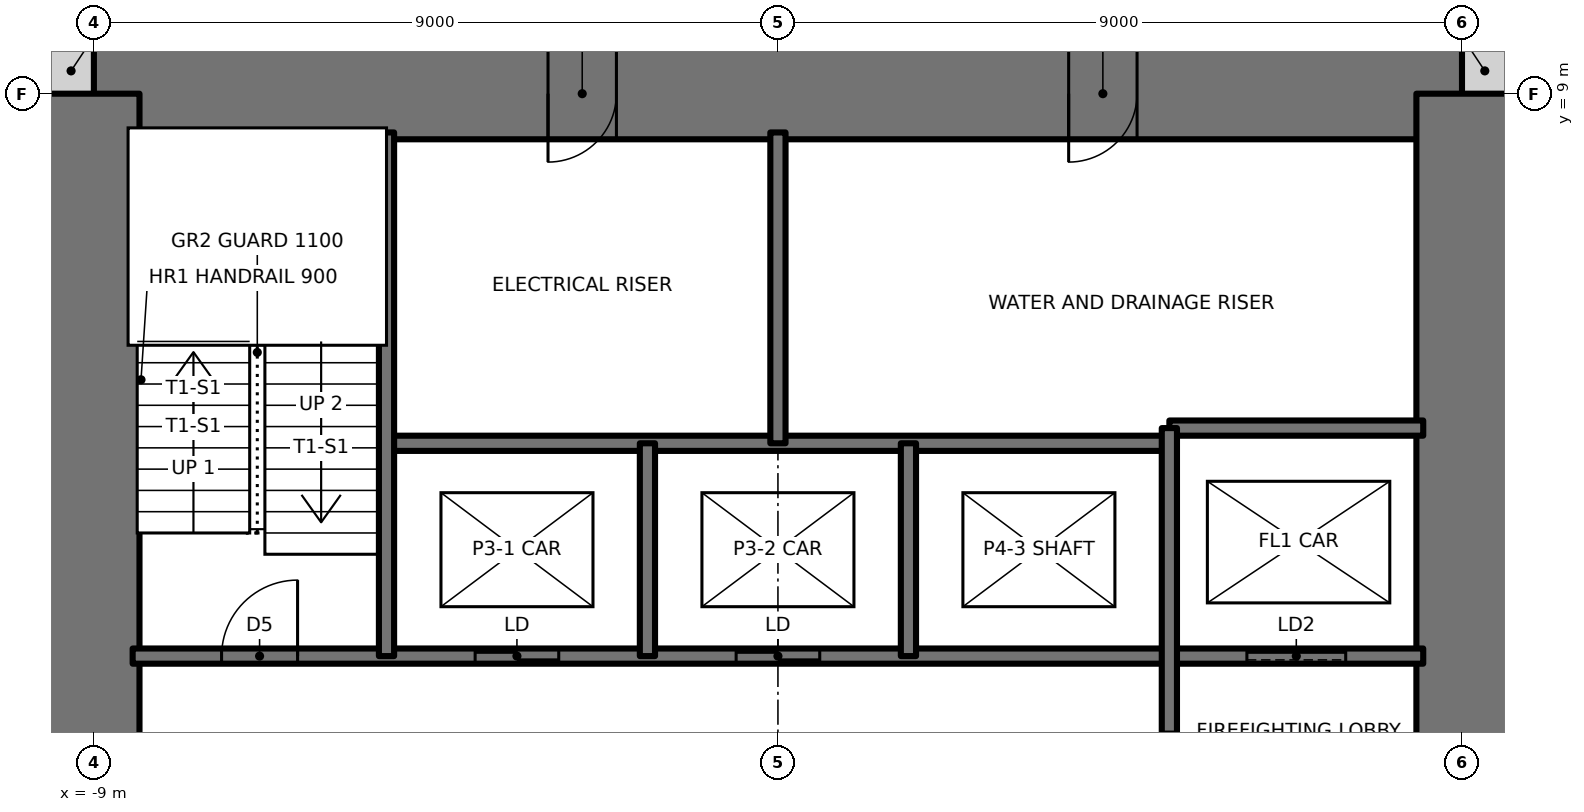
"""IFC4 building model, lengths in metres.
Left out: names, types, materials, properties, quantities, classifications, styles, units other than length and angle.
Written with IfcOpenShell. Run it as: python <this file> out.ifc"""

import sys

from ifc_helpers import new_model, si_unit, direction, frame, frame_2d, origin, place, context, subcontext, project, spatial, rectangle, extrude, element, fill, save


model = new_model("IFC4")
c1 = context("Model", 3, precision=1e-05, world=origin(), true_north=direction((0.0, 1.0)))
c2 = subcontext(c1, "Body", "Model", "MODEL_VIEW")
j1 = project(units=[si_unit("LENGTHUNIT", "METRE"), si_unit("PLANEANGLEUNIT", "RADIAN")], contexts=[c1])
p1 = place(None, origin())
s1 = spatial("IfcSite", under=j1, at=p1, CompositionType="ELEMENT")
p2 = place(p1, origin())
s2 = spatial("IfcBuilding", under=s1, at=p2, CompositionType="ELEMENT")
p3 = place(p2, frame((0.0, 0.0, 188.0)))
s3 = spatial("IfcBuildingStorey", under=s2, at=p3, CompositionType="ELEMENT", Elevation=188.0)
for number, where, z_axis, x_axis in (
    (1, (9.0, 9.3, 0.0), (0.0, 0.0, 1.0), (1.0, 0.0, 0.0)),
    (2, (-9.6, 9.3, 0.0), (0.0, 0.0, 1.0), (1.0, 0.0, 0.0)),
):
    element("IfcWall", number, at=place(p3, frame(where, z_axis=z_axis, x_axis=x_axis)), inside=s3, PredefinedType="SOLIDWALL", context=c2, shape_type="SweptSolid", body=[
        extrude(rectangle(XDim=0.6, YDim=0.6, at=frame_2d((0.3, 0.0))), origin(), (0.0, 0.0, 1.0), 3.5),
    ])
p4 = place(p3, frame((9.0, 9.0, 0.0), z_axis=(0.0, 0.0, 1.0), x_axis=(-1.0, 0.0, 0.0)))
e3 = element("IfcWall", 3, at=p4, inside=s3, PredefinedType="SHEAR", context=c2, shape_type="SweptSolid", body=[
    extrude(rectangle(XDim=18.0, YDim=1.2, at=frame_2d((9.0, 0.0))), origin(), (0.0, 0.0, 1.0), 3.5),
])
p5 = place(p4, frame((11.125, 0.0, 0.0)))
e4 = element("IfcOpeningElement", 4, at=p5, cuts=e3, PredefinedType="OPENING", context=c2, shape_type="SweptSolid", body=[
    extrude(rectangle(XDim=0.9, YDim=2.1, at=frame_2d((0.45, 1.05))), frame((0.0, 0.61, 0.0), z_axis=(0.0, -1.0, 0.0), x_axis=(1.0, 0.0, 0.0)), (0.0, 0.0, 1.0), 1.22),
])
p6 = place(p4, frame((4.275, 0.0, 0.0)))
e5 = element("IfcOpeningElement", 5, at=p6, cuts=e3, PredefinedType="OPENING", context=c2, shape_type="SweptSolid", body=[
    extrude(rectangle(XDim=0.9, YDim=2.1, at=frame_2d((0.45, 1.05))), frame((0.0, 0.61, 0.0), z_axis=(0.0, -1.0, 0.0), x_axis=(1.0, 0.0, 0.0)), (0.0, 0.0, 1.0), 1.22),
])
p7 = place(p3, frame((9.0, -9.0, 0.0), z_axis=(0.0, 0.0, 1.0), x_axis=(0.0, 1.0, 0.0)))
e6 = element("IfcWall", 6, at=p7, inside=s3, PredefinedType="SHEAR", context=c2, shape_type="SweptSolid", body=[
    extrude(rectangle(XDim=18.0, YDim=1.2, at=frame_2d((9.0, 0.0))), origin(), (0.0, 0.0, 1.0), 3.5),
])
p8 = place(p7, frame((8.5, 0.0, 0.0)))
e7 = element("IfcOpeningElement", 7, at=p8, cuts=e6, PredefinedType="OPENING", context=c2, shape_type="SweptSolid", body=[
    extrude(rectangle(XDim=1.0, YDim=2.1, at=frame_2d((0.5, 1.05))), frame((0.0, 0.61, 0.0), z_axis=(0.0, -1.0, 0.0), x_axis=(1.0, 0.0, 0.0)), (0.0, 0.0, 1.0), 1.22),
])
p9 = place(p3, frame((-9.0, 9.0, 0.0), z_axis=(0.0, 0.0, 1.0), x_axis=(0.0, -1.0, 0.0)))
e8 = element("IfcWall", 8, at=p9, inside=s3, PredefinedType="SHEAR", context=c2, shape_type="SweptSolid", body=[
    extrude(rectangle(XDim=18.0, YDim=1.2, at=frame_2d((9.0, 0.0))), origin(), (0.0, 0.0, 1.0), 3.5),
])
p10 = place(p9, frame((8.5, 0.0, 0.0)))
e9 = element("IfcOpeningElement", 9, at=p10, cuts=e8, PredefinedType="OPENING", context=c2, shape_type="SweptSolid", body=[
    extrude(rectangle(XDim=1.0, YDim=2.1, at=frame_2d((0.5, 1.05))), frame((0.0, 0.61, 0.0), z_axis=(0.0, -1.0, 0.0), x_axis=(1.0, 0.0, 0.0)), (0.0, 0.0, 1.0), 1.22),
])
p11 = place(p3, frame((-8.49, 1.6, 0.0), z_axis=(0.0, 0.0, 1.0), x_axis=(1.0, 0.0, 0.0)))
e10 = element("IfcWall", 10, at=p11, inside=s3, PredefinedType="SOLIDWALL", context=c2, shape_type="SweptSolid", body=[
    extrude(rectangle(XDim=16.98, YDim=0.2, at=frame_2d((8.49, 0.0))), origin(), (0.0, 0.0, 1.0), 3.5),
])
p12 = place(p11, frame((1.17, 0.0, 0.0)))
e11 = element("IfcOpeningElement", 11, at=p12, cuts=e10, PredefinedType="OPENING", context=c2, shape_type="SweptSolid", body=[
    extrude(rectangle(XDim=1.0, YDim=2.1, at=frame_2d((0.5, 1.05))), frame((0.0, 0.11, 0.0), z_axis=(0.0, -1.0, 0.0), x_axis=(1.0, 0.0, 0.0)), (0.0, 0.0, 1.0), 0.22),
])
p13 = place(p11, frame((4.506, 0.0, 0.0)))
e12 = element("IfcOpeningElement", 12, at=p13, cuts=e10, PredefinedType="OPENING", context=c2, shape_type="SweptSolid", body=[
    extrude(rectangle(XDim=1.1, YDim=2.1, at=frame_2d((0.55, 1.05))), frame((0.0, 0.11, 0.0), z_axis=(0.0, -1.0, 0.0), x_axis=(1.0, 0.0, 0.0)), (0.0, 0.0, 1.0), 0.22),
])
p14 = place(p11, frame((7.94, 0.0, 0.0)))
e13 = element("IfcOpeningElement", 13, at=p14, cuts=e10, PredefinedType="OPENING", context=c2, shape_type="SweptSolid", body=[
    extrude(rectangle(XDim=1.1, YDim=2.1, at=frame_2d((0.55, 1.05))), frame((0.0, 0.11, 0.0), z_axis=(0.0, -1.0, 0.0), x_axis=(1.0, 0.0, 0.0)), (0.0, 0.0, 1.0), 0.22),
])
p15 = place(p11, frame((14.66, 0.0, 0.0)))
e14 = element("IfcOpeningElement", 14, at=p15, cuts=e10, PredefinedType="OPENING", context=c2, shape_type="SweptSolid", body=[
    extrude(rectangle(XDim=1.3, YDim=2.1, at=frame_2d((0.65, 1.05))), frame((0.0, 0.11, 0.0), z_axis=(0.0, -1.0, 0.0), x_axis=(1.0, 0.0, 0.0)), (0.0, 0.0, 1.0), 0.22),
])
p16 = place(p3, frame((-5.15, 4.4, 0.0), z_axis=(0.0, 0.0, 1.0), x_axis=(1.0, 0.0, 0.0)))
e15 = element("IfcWall", 15, at=p16, inside=s3, PredefinedType="SOLIDWALL", context=c2, shape_type="SweptSolid", body=[
    extrude(rectangle(XDim=10.3, YDim=0.2, at=frame_2d((5.15, 0.0))), origin(), (0.0, 0.0, 1.0), 3.5),
])
p17 = place(p3, frame((5.15, 4.6, 0.0), z_axis=(0.0, 0.0, 1.0), x_axis=(1.0, 0.0, 0.0)))
e16 = element("IfcWall", 16, at=p17, inside=s3, PredefinedType="SOLIDWALL", context=c2, shape_type="SweptSolid", body=[
    extrude(rectangle(XDim=3.34, YDim=0.2, at=frame_2d((1.67, 0.0))), origin(), (0.0, 0.0, 1.0), 3.5),
])
p18 = place(p3, frame((5.15, -8.49, 0.0), z_axis=(0.0, 0.0, 1.0), x_axis=(0.0, 1.0, 0.0)))
e17 = element("IfcWall", 17, at=p18, inside=s3, PredefinedType="SOLIDWALL", context=c2, shape_type="SweptSolid", body=[
    extrude(rectangle(XDim=13.09, YDim=0.2, at=frame_2d((6.545, 0.0))), origin(), (0.0, 0.0, 1.0), 3.5),
])
p19 = place(p18, frame((7.89, 0.0, 0.0)))
e18 = element("IfcOpeningElement", 18, at=p19, cuts=e17, PredefinedType="OPENING", context=c2, shape_type="SweptSolid", body=[
    extrude(rectangle(XDim=1.2, YDim=2.1, at=frame_2d((0.6, 1.05))), frame((0.0, 0.11, 0.0), z_axis=(0.0, -1.0, 0.0), x_axis=(1.0, 0.0, 0.0)), (0.0, 0.0, 1.0), 0.22),
])
p20 = place(p3, frame((1.717, 1.6, 0.0), z_axis=(0.0, 0.0, 1.0), x_axis=(0.0, 1.0, 0.0)))
e19 = element("IfcWall", 19, at=p20, inside=s3, PredefinedType="SOLIDWALL", context=c2, shape_type="SweptSolid", body=[
    extrude(rectangle(XDim=2.8, YDim=0.2, at=frame_2d((1.4, 0.0))), origin(), (0.0, 0.0, 1.0), 3.5),
])
p21 = place(p3, frame((0.0, 4.4, 0.0), z_axis=(0.0, 0.0, 1.0), x_axis=(0.0, 1.0, 0.0)))
e20 = element("IfcWall", 20, at=p21, inside=s3, PredefinedType="SOLIDWALL", context=c2, shape_type="SweptSolid", body=[
    extrude(rectangle(XDim=4.09, YDim=0.2, at=frame_2d((2.045, 0.0))), origin(), (0.0, 0.0, 1.0), 3.5),
])
p22 = place(p3, frame((-1.717, 1.6, 0.0), z_axis=(0.0, 0.0, 1.0), x_axis=(0.0, 1.0, 0.0)))
e21 = element("IfcWall", 21, at=p22, inside=s3, PredefinedType="SOLIDWALL", context=c2, shape_type="SweptSolid", body=[
    extrude(rectangle(XDim=2.8, YDim=0.2, at=frame_2d((1.4, 0.0))), origin(), (0.0, 0.0, 1.0), 3.5),
])
p23 = place(p3, frame((-5.15, 1.6, 0.0), z_axis=(0.0, 0.0, 1.0), x_axis=(0.0, 1.0, 0.0)))
e22 = element("IfcWall", 22, at=p23, inside=s3, PredefinedType="SOLIDWALL", context=c2, shape_type="SweptSolid", body=[
    extrude(rectangle(XDim=6.89, YDim=0.2, at=frame_2d((3.445, 0.0))), origin(), (0.0, 0.0, 1.0), 3.5),
])
p24 = place(p12, origin())
e23 = element("IfcDoor", 23, at=p24, inside=s3, OperationType="SINGLE_SWING_RIGHT", PredefinedType="DOOR", context=c2, shape_type="SweptSolid", body=[
    extrude(rectangle(XDim=1.0, YDim=2.1, at=frame_2d((0.5, 1.05))), frame((0.0, 0.025, 0.0), z_axis=(0.0, -1.0, 0.0), x_axis=(1.0, 0.0, 0.0)), (0.0, 0.0, 1.0), 0.05),
])
fill(e11, e23)
p25 = place(p5, origin())
e24 = element("IfcDoor", 24, at=p25, inside=s3, OperationType="SINGLE_SWING_RIGHT", PredefinedType="DOOR", context=c2, shape_type="SweptSolid", body=[
    extrude(rectangle(XDim=0.9, YDim=2.1, at=frame_2d((0.45, 1.05))), frame((0.0, 0.025, 0.0), z_axis=(0.0, -1.0, 0.0), x_axis=(1.0, 0.0, 0.0)), (0.0, 0.0, 1.0), 0.05),
])
fill(e4, e24)
p26 = place(p6, origin())
e25 = element("IfcDoor", 25, at=p26, inside=s3, OperationType="SINGLE_SWING_RIGHT", PredefinedType="DOOR", context=c2, shape_type="SweptSolid", body=[
    extrude(rectangle(XDim=0.9, YDim=2.1, at=frame_2d((0.45, 1.05))), frame((0.0, 0.025, 0.0), z_axis=(0.0, -1.0, 0.0), x_axis=(1.0, 0.0, 0.0)), (0.0, 0.0, 1.0), 0.05),
])
fill(e5, e25)
p27 = place(p13, origin())
e26 = element("IfcDoor", 26, at=p27, inside=s3, OperationType="DOUBLE_DOOR_SLIDING", PredefinedType="DOOR", context=c2, shape_type="SweptSolid", body=[
    extrude(rectangle(XDim=1.1, YDim=2.1, at=frame_2d((0.55, 1.05))), frame((0.0, 0.025, 0.0), z_axis=(0.0, -1.0, 0.0), x_axis=(1.0, 0.0, 0.0)), (0.0, 0.0, 1.0), 0.05),
])
fill(e12, e26)
p28 = place(p14, origin())
e27 = element("IfcDoor", 27, at=p28, inside=s3, OperationType="DOUBLE_DOOR_SLIDING", PredefinedType="DOOR", context=c2, shape_type="SweptSolid", body=[
    extrude(rectangle(XDim=1.1, YDim=2.1, at=frame_2d((0.55, 1.05))), frame((0.0, 0.025, 0.0), z_axis=(0.0, -1.0, 0.0), x_axis=(1.0, 0.0, 0.0)), (0.0, 0.0, 1.0), 0.05),
])
fill(e13, e27)
p29 = place(p15, origin())
e28 = element("IfcDoor", 28, at=p29, inside=s3, OperationType="SLIDING_TO_LEFT", PredefinedType="DOOR", context=c2, shape_type="SweptSolid", body=[
    extrude(rectangle(XDim=1.3, YDim=2.1, at=frame_2d((0.65, 1.05))), frame((0.0, 0.025, 0.0), z_axis=(0.0, -1.0, 0.0), x_axis=(1.0, 0.0, 0.0)), (0.0, 0.0, 1.0), 0.05),
])
fill(e14, e28)
save(model, sys.argv[1])
